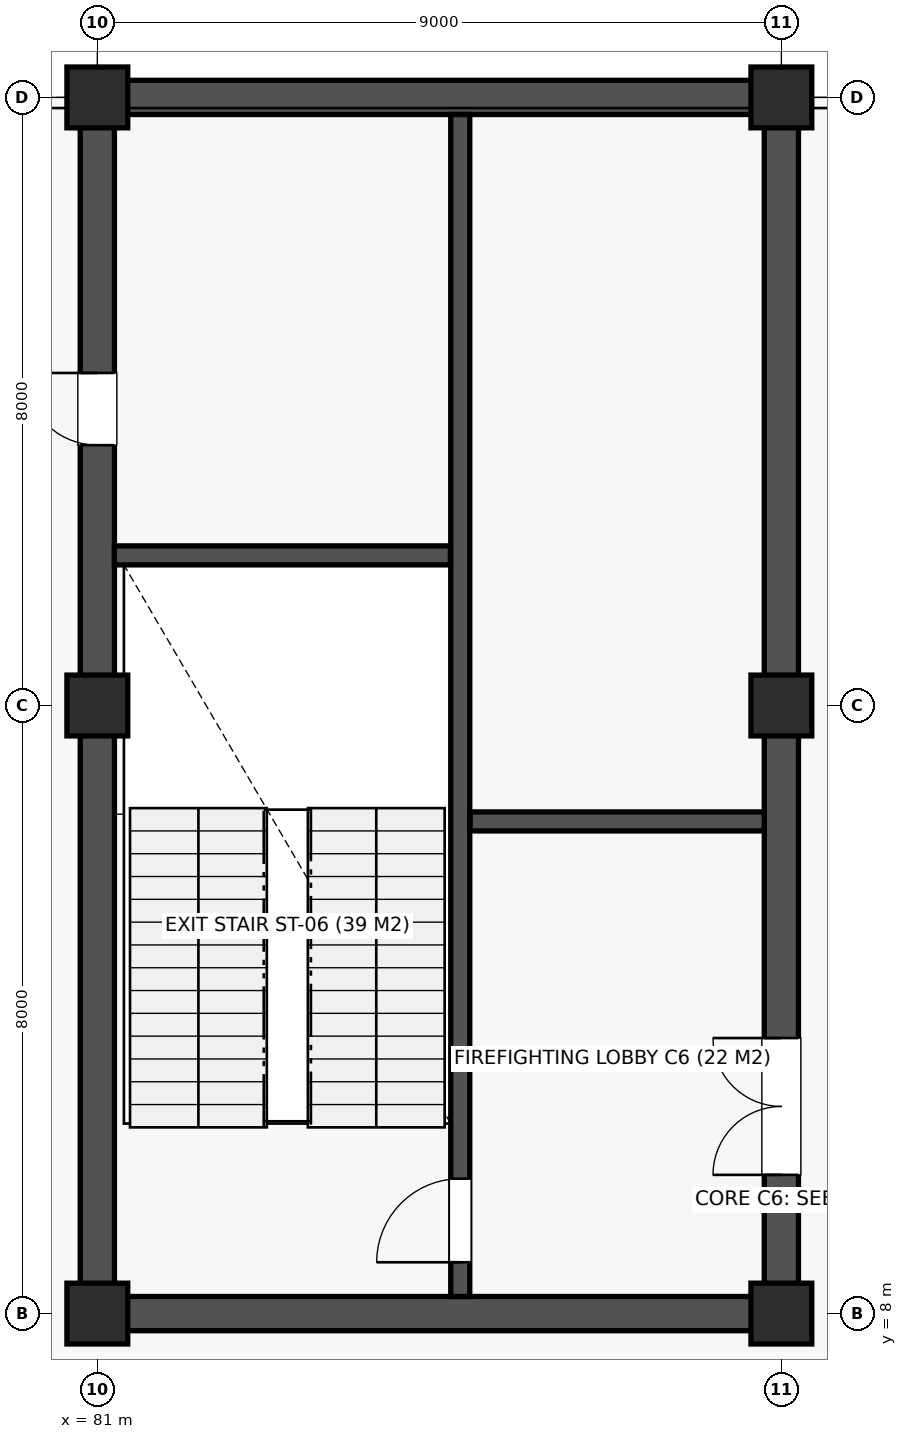
"""IFC4 building model, lengths in metres.
Left out: names, types, materials, properties, quantities, classifications, styles, units other than length and angle.
Written with IfcOpenShell. Run it as: python <this file> out.ifc"""

import sys

from ifc_helpers import new_model, si_unit, direction, frame, frame_2d, origin, origin_2d, place, context, subcontext, project, spatial, rectangle, extrude, element, fill, save


model = new_model("IFC4")
c1 = context("Model", 3, precision=1e-05, world=origin(), true_north=direction((0.0, 1.0)))
c2 = subcontext(c1, "Body", "Model", "MODEL_VIEW")
j1 = project(units=[si_unit("LENGTHUNIT", "METRE"), si_unit("PLANEANGLEUNIT", "RADIAN")], contexts=[c1])
p1 = place(None, origin())
s1 = spatial("IfcSite", under=j1, at=p1, CompositionType="ELEMENT")
p2 = place(p1, origin())
s2 = spatial("IfcBuilding", under=s1, at=p2, CompositionType="ELEMENT")
p3 = place(p2, frame((0.0, 0.0, 9.0)))
s3 = spatial("IfcBuildingStorey", under=s2, at=p3, CompositionType="ELEMENT", Elevation=9.0)
for number, where, z_axis, x_axis in (
    (1, (81.0, 8.0, 0.0), (0.0, 0.0, 1.0), (1.0, 0.0, 0.0)),
    (2, (81.0, 16.0, 0.0), (0.0, 0.0, 1.0), (1.0, 0.0, 0.0)),
    (3, (81.0, 24.0, 0.0), (0.0, 0.0, 1.0), (1.0, 0.0, 0.0)),
    (4, (90.0, 8.0, 0.0), (0.0, 0.0, 1.0), (1.0, 0.0, 0.0)),
    (5, (90.0, 16.0, 0.0), (0.0, 0.0, 1.0), (1.0, 0.0, 0.0)),
    (6, (90.0, 24.0, 0.0), (0.0, 0.0, 1.0), (1.0, 0.0, 0.0)),
):
    element("IfcColumn", number, at=place(p3, frame(where, z_axis=z_axis, x_axis=x_axis)), inside=s3, PredefinedType="COLUMN", context=c2, shape_type="SweptSolid", body=[
        extrude(rectangle(XDim=0.8, YDim=0.8, at=origin_2d()), origin(), (0.0, 0.0, 1.0), 4.5),
    ])
for number, where, z_axis, x_axis in (
    (7, (81.225, 8.0, 0.0), (0.0, 0.0, 1.0), (1.0, 0.0, 0.0)),
    (8, (81.225, 24.0, 0.0), (0.0, 0.0, 1.0), (1.0, 0.0, 0.0)),
):
    element("IfcWall", number, at=place(p3, frame(where, z_axis=z_axis, x_axis=x_axis)), inside=s3, PredefinedType="SHEAR", context=c2, shape_type="SweptSolid", body=[
        extrude(rectangle(XDim=8.55, YDim=0.45, at=frame_2d((4.275, 0.0))), origin(), (0.0, 0.0, 1.0), 4.14),
    ])
p4 = place(p3, frame((81.0, 8.225, 0.0), z_axis=(0.0, 0.0, 1.0), x_axis=(0.0, 1.0, 0.0)))
e9 = element("IfcWall", 9, at=p4, inside=s3, PredefinedType="SHEAR", context=c2, shape_type="SweptSolid", body=[
    extrude(rectangle(XDim=15.55, YDim=0.45, at=frame_2d((7.775, 0.0))), origin(), (0.0, 0.0, 1.0), 4.14),
])
p5 = place(p4, frame((11.2, 0.0, 0.0)))
e10 = element("IfcOpeningElement", 10, at=p5, cuts=e9, PredefinedType="OPENING", context=c2, shape_type="SweptSolid", body=[
    extrude(rectangle(XDim=0.95, YDim=2.1, at=frame_2d((0.475, 1.05))), frame((0.0, 0.237, 0.0), z_axis=(0.0, -1.0, 0.0), x_axis=(1.0, 0.0, 0.0)), (0.0, 0.0, 1.0), 0.474),
])
p6 = place(p3, frame((90.0, 8.225, 0.0), z_axis=(0.0, 0.0, 1.0), x_axis=(0.0, 1.0, 0.0)))
e11 = element("IfcWall", 11, at=p6, inside=s3, PredefinedType="SHEAR", context=c2, shape_type="SweptSolid", body=[
    extrude(rectangle(XDim=15.55, YDim=0.45, at=frame_2d((7.775, 0.0))), origin(), (0.0, 0.0, 1.0), 4.14),
])
p7 = place(p6, frame((1.6, 0.0, 0.0)))
e12 = element("IfcOpeningElement", 12, at=p7, cuts=e11, PredefinedType="OPENING", context=c2, shape_type="SweptSolid", body=[
    extrude(rectangle(XDim=1.8, YDim=2.18, at=frame_2d((0.9, 1.09))), frame((0.0, 0.237, 0.0), z_axis=(0.0, -1.0, 0.0), x_axis=(1.0, 0.0, 0.0)), (0.0, 0.0, 1.0), 0.474),
])
p8 = place(p3, frame((85.775, 8.225, 0.0), z_axis=(0.0, 0.0, 1.0), x_axis=(0.0, 1.0, 0.0)))
e13 = element("IfcWall", 13, at=p8, inside=s3, PredefinedType="SOLIDWALL", context=c2, shape_type="SweptSolid", body=[
    extrude(rectangle(XDim=15.55, YDim=0.25, at=frame_2d((7.775, 0.0))), origin(), (0.0, 0.0, 1.0), 4.14),
])
p9 = place(p8, frame((0.45, 0.0, 0.0)))
e14 = element("IfcOpeningElement", 14, at=p9, cuts=e13, PredefinedType="OPENING", context=c2, shape_type="SweptSolid", body=[
    extrude(rectangle(XDim=1.1, YDim=2.15, at=frame_2d((0.55, 1.075))), frame((0.0, 0.137, 0.0), z_axis=(0.0, -1.0, 0.0), x_axis=(1.0, 0.0, 0.0)), (0.0, 0.0, 1.0), 0.274),
])
p10 = place(p3, frame((81.225, 17.975, 0.0), z_axis=(0.0, 0.0, 1.0), x_axis=(1.0, 0.0, 0.0)))
e15 = element("IfcWall", 15, at=p10, inside=s3, PredefinedType="SOLIDWALL", context=c2, shape_type="SweptSolid", body=[
    extrude(rectangle(XDim=4.42, YDim=0.25, at=frame_2d((2.21, 0.0))), origin(), (0.0, 0.0, 1.0), 4.14),
])
p11 = place(p3, frame((85.905, 14.475, 0.0), z_axis=(0.0, 0.0, 1.0), x_axis=(1.0, 0.0, 0.0)))
e16 = element("IfcWall", 16, at=p11, inside=s3, PredefinedType="SOLIDWALL", context=c2, shape_type="SweptSolid", body=[
    extrude(rectangle(XDim=3.87, YDim=0.25, at=frame_2d((1.935, 0.0))), origin(), (0.0, 0.0, 1.0), 4.14),
])
p12 = place(p7, origin())
e17 = element("IfcDoor", 17, at=p12, inside=s3, OperationType="DOUBLE_DOOR_SINGLE_SWING", PredefinedType="DOOR", context=c2, shape_type="SweptSolid", body=[
    extrude(rectangle(XDim=1.8, YDim=2.18, at=frame_2d((0.9, 1.09))), frame((0.0, 0.025, 0.0), z_axis=(0.0, -1.0, 0.0), x_axis=(1.0, 0.0, 0.0)), (0.0, 0.0, 1.0), 0.05),
])
fill(e12, e17)
p13 = place(p9, origin())
e18 = element("IfcDoor", 18, at=p13, inside=s3, OperationType="SINGLE_SWING_LEFT", PredefinedType="DOOR", context=c2, shape_type="SweptSolid", body=[
    extrude(rectangle(XDim=1.1, YDim=2.15, at=frame_2d((0.55, 1.075))), frame((0.0, 0.025, 0.0), z_axis=(0.0, -1.0, 0.0), x_axis=(1.0, 0.0, 0.0)), (0.0, 0.0, 1.0), 0.05),
])
fill(e14, e18)
p14 = place(p5, origin())
e19 = element("IfcDoor", 19, at=p14, inside=s3, OperationType="SINGLE_SWING_RIGHT", PredefinedType="DOOR", context=c2, shape_type="SweptSolid", body=[
    extrude(rectangle(XDim=0.95, YDim=2.1, at=frame_2d((0.475, 1.05))), frame((0.0, 0.025, 0.0), z_axis=(0.0, -1.0, 0.0), x_axis=(1.0, 0.0, 0.0)), (0.0, 0.0, 1.0), 0.05),
])
fill(e10, e19)
save(model, sys.argv[1])
